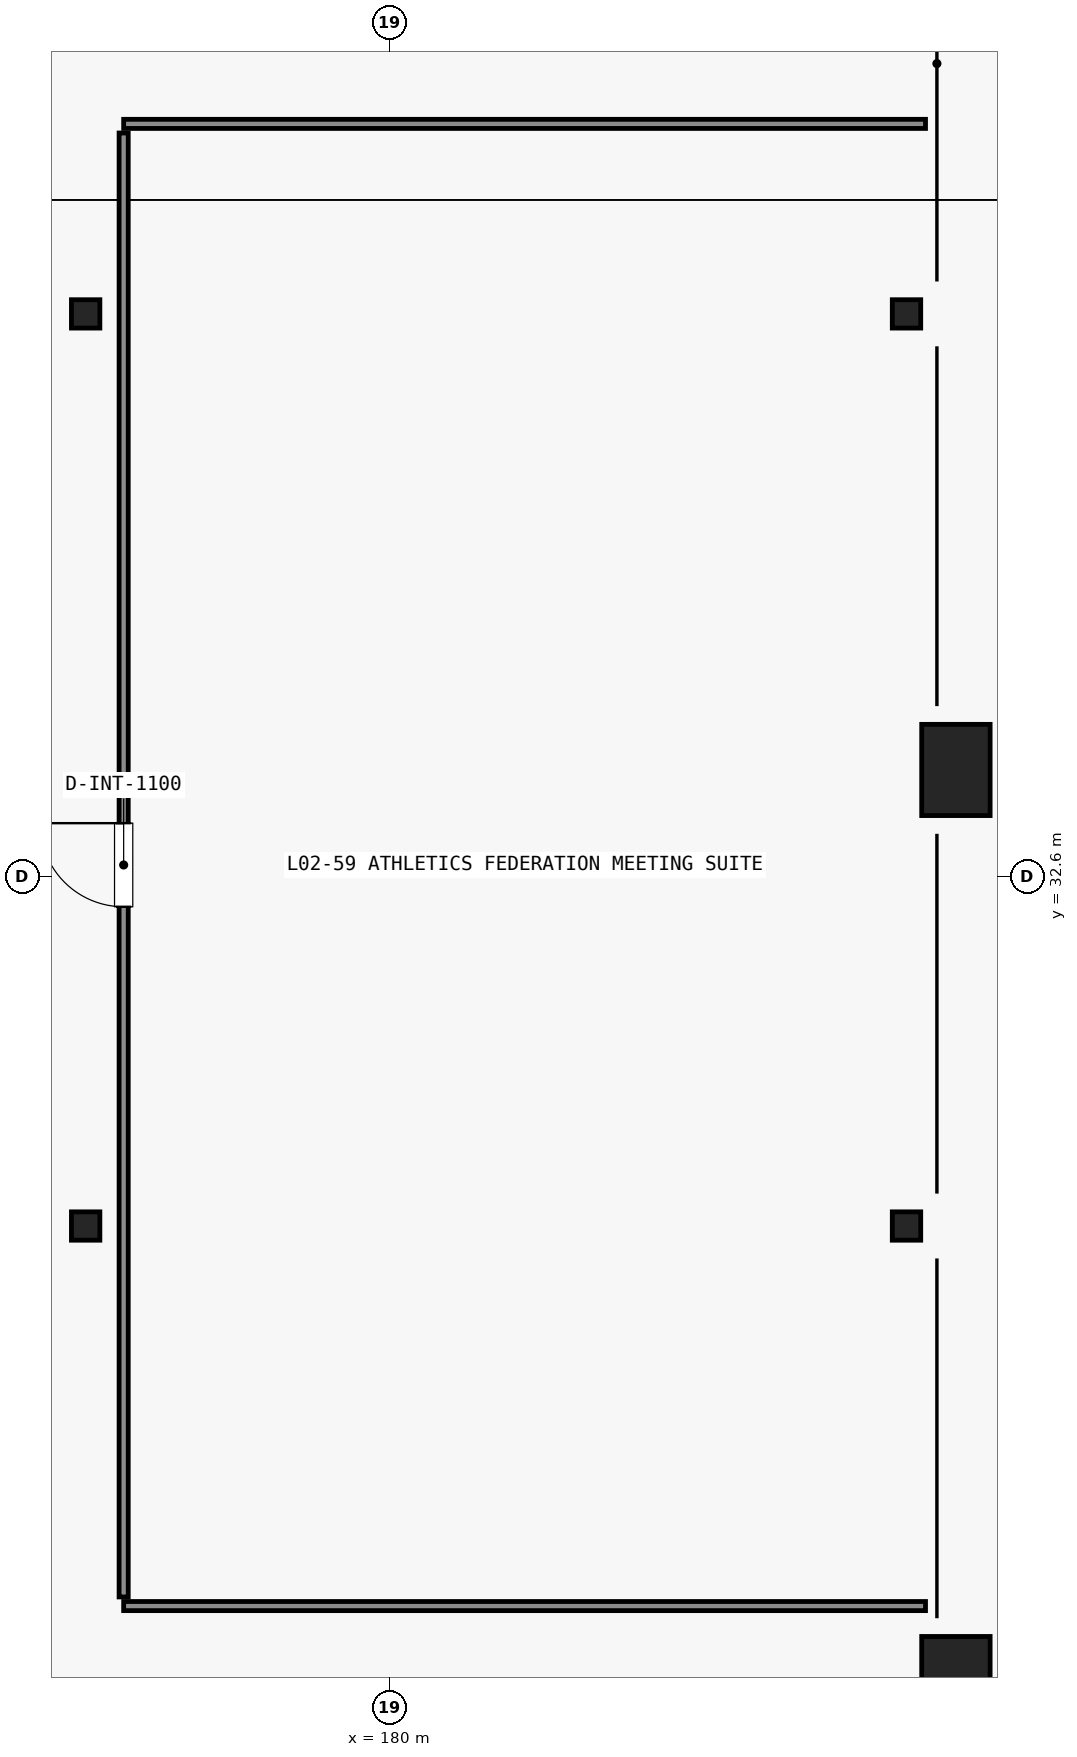
"""IFC4 building model, lengths in metres.
Left out: names, types, materials, properties, quantities, classifications, styles, units other than length and angle.
Written with IfcOpenShell. Run it as: python <this file> out.ifc"""

import sys

from ifc_helpers import new_model, si_unit, direction, frame, frame_2d, origin, origin_2d, place, context, subcontext, project, spatial, rectangle, i_section, extrude, element, fill, save


model = new_model("IFC4")
c1 = context("Model", 3, precision=1e-05, world=origin(), true_north=direction((0.0, 1.0)))
c2 = subcontext(c1, "Body", "Model", "MODEL_VIEW")
j1 = project(units=[si_unit("LENGTHUNIT", "METRE"), si_unit("PLANEANGLEUNIT", "RADIAN")], contexts=[c1])
p1 = place(None, origin())
s1 = spatial("IfcSite", under=j1, at=p1, CompositionType="ELEMENT")
p2 = place(p1, origin())
s2 = spatial("IfcBuilding", under=s1, at=p2, CompositionType="ELEMENT")
p3 = place(p2, frame((0.0, 0.0, 11.4)))
s3 = spatial("IfcBuildingStorey", under=s2, at=p3, CompositionType="ELEMENT", Elevation=11.4)
for number, where, z_axis, x_axis in (
    (1, (187.45, 22.0, 0.0), (0.0, 0.0, 1.0), (1.0, 0.0, 0.0)),
    (2, (187.45, 34.0, 0.0), (0.0, 0.0, 1.0), (1.0, 0.0, 0.0)),
):
    element("IfcColumn", number, at=place(p3, frame(where, z_axis=z_axis, x_axis=x_axis)), inside=s3, PredefinedType="PILASTER", context=c2, shape_type="SweptSolid", body=[
        extrude(rectangle(XDim=0.9, YDim=1.2, at=origin_2d()), origin(), (0.0, 0.0, 1.0), 4.48),
    ])
for number, where, z_axis, x_axis in (
    (3, (176.0, 28.0, 0.0), (0.0, 0.0, 1.0), (1.0, 0.0, 0.0)),
    (4, (176.0, 40.0, 0.0), (0.0, 0.0, 1.0), (1.0, 0.0, 0.0)),
    (5, (186.8, 28.0, 0.0), (0.0, 0.0, 1.0), (1.0, 0.0, 0.0)),
    (6, (186.8, 40.0, 0.0), (0.0, 0.0, 1.0), (1.0, 0.0, 0.0)),
):
    element("IfcColumn", number, at=place(p3, frame(where, z_axis=z_axis, x_axis=x_axis)), inside=s3, PredefinedType="COLUMN", context=c2, shape_type="SweptSolid", body=[
        extrude(i_section(OverallWidth=0.374, OverallDepth=0.373, WebThickness=0.016, FlangeThickness=0.026, FilletRadius=0.018, at=origin_2d()), origin(), (0.0, 0.0, 1.0), 4.48),
    ])
for number, where, z_axis, x_axis in (
    (7, (176.5, 23.0, 0.0), (0.0, 0.0, 1.0), (1.0, 0.0, 0.0)),
    (8, (176.5, 42.5, 0.0), (0.0, 0.0, 1.0), (1.0, 0.0, 0.0)),
):
    element("IfcWall", number, at=place(p3, frame(where, z_axis=z_axis, x_axis=x_axis)), inside=s3, PredefinedType="PARTITIONING", context=c2, shape_type="SweptSolid", body=[
        extrude(rectangle(XDim=10.55, YDim=0.12, at=frame_2d((5.275, 0.0))), origin(), (0.0, 0.0, 1.0), 3.787),
    ])
p4 = place(p3, frame((176.5, 23.12, 0.0), z_axis=(0.0, 0.0, 1.0), x_axis=(0.0, 1.0, 0.0)))
e9 = element("IfcWall", 9, at=p4, inside=s3, PredefinedType="PARTITIONING", context=c2, shape_type="SweptSolid", body=[
    extrude(rectangle(XDim=19.26, YDim=0.12, at=frame_2d((9.63, 0.0))), origin(), (0.0, 0.0, 1.0), 3.548),
])
p5 = place(p4, frame((9.08, 0.0, 0.0)))
e10 = element("IfcOpeningElement", 10, at=p5, cuts=e9, PredefinedType="OPENING", context=c2, shape_type="SweptSolid", body=[
    extrude(rectangle(XDim=1.1, YDim=2.2, at=frame_2d((0.55, 1.1))), frame((0.0, 0.07, 0.0), z_axis=(0.0, -1.0, 0.0), x_axis=(1.0, 0.0, 0.0)), (0.0, 0.0, 1.0), 0.14),
])
p6 = place(p5, origin())
e11 = element("IfcDoor", 11, at=p6, inside=s3, OperationType="SINGLE_SWING_RIGHT", PredefinedType="DOOR", context=c2, shape_type="SweptSolid", body=[
    extrude(rectangle(XDim=1.1, YDim=2.2, at=frame_2d((0.55, 1.1))), frame((0.0, 0.025, 0.0), z_axis=(0.0, -1.0, 0.0), x_axis=(1.0, 0.0, 0.0)), (0.0, 0.0, 1.0), 0.05),
])
fill(e10, e11)
save(model, sys.argv[1])
